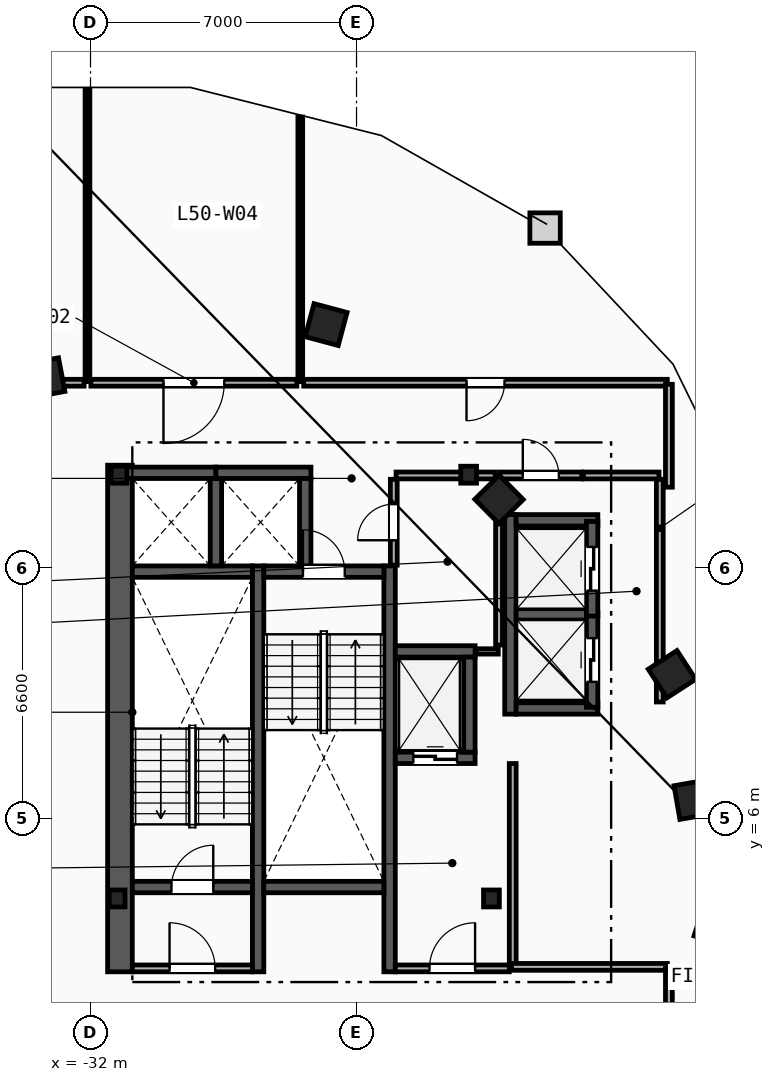
"""IFC4 building model, lengths in metres.
Left out: names, types, materials, properties, quantities, classifications, styles, units other than length and angle.
Written with IfcOpenShell. Run it as: python <this file> out.ifc"""

import sys

from ifc_helpers import new_model, si_unit, direction, frame, frame_2d, origin, origin_2d, place, context, subcontext, project, spatial, rectangle, i_section, extrude, element, fill, save


model = new_model("IFC4")
c1 = context("Model", 3, precision=1e-05, world=origin(), true_north=direction((0.0, 1.0)))
c2 = subcontext(c1, "Body", "Model", "MODEL_VIEW")
j1 = project(units=[si_unit("LENGTHUNIT", "METRE"), si_unit("PLANEANGLEUNIT", "RADIAN")], contexts=[c1])
p1 = place(None, origin())
s1 = spatial("IfcSite", under=j1, at=p1, CompositionType="ELEMENT")
p2 = place(p1, origin())
s2 = spatial("IfcBuilding", under=s1, at=p2, CompositionType="ELEMENT")
p3 = place(p2, frame((0.0, 0.0, 191.8)))
s3 = spatial("IfcBuildingStorey", under=s2, at=p3, CompositionType="ELEMENT", Elevation=191.8)
for number, where, z_axis, x_axis in (
    (1, (-31.3, 3.9, 0.0), (0.0, 0.0, 1.0), (1.0, 0.0, 0.0)),
    (2, (-21.45, 3.9, 0.0), (0.0, 0.0, 1.0), (1.0, 0.0, 0.0)),
    (3, (-22.05, 15.05, 0.0), (0.0, 0.0, 1.0), (1.0, 0.0, 0.0)),
    (4, (-31.25, 15.05, 0.0), (0.0, 0.0, 1.0), (1.0, 0.0, 0.0)),
):
    element("IfcColumn", number, at=place(p3, frame(where, z_axis=z_axis, x_axis=x_axis)), inside=s3, PredefinedType="COLUMN", context=c2, shape_type="SweptSolid", body=[
        extrude(i_section(OverallWidth=0.416, OverallDepth=0.446, WebThickness=0.039, FlangeThickness=0.063, FilletRadius=0.018, at=origin_2d()), origin(), (0.0, 0.0, 1.0), 3.6),
    ])
for number, where, z_axis, x_axis in (
    (5, (-15.55, 3.2, 0.0), (0.0, 0.0, 1.0), (0.315, 0.949, 0.0)),
    (6, (-16.125, 6.5, 0.0), (0.0, 0.0, 1.0), (-0.172, 0.985, 0.0)),
    (7, (-16.7, 9.8, 0.0), (0.0, 0.0, 1.0), (-0.544, 0.839, 0.0)),
    (8, (-21.25, 14.4, 0.0), (0.0, 0.0, 1.0), (-0.703, 0.711, 0.0)),
    (9, (-25.8, 19.0, 0.0), (0.0, 0.0, 1.0), (-0.966, 0.259, 0.0)),
    (10, (-33.2, 17.6, 0.0), (0.0, 0.0, 1.0), (-0.983, -0.186, 0.0)),
):
    element("IfcColumn", number, at=place(p3, frame(where, z_axis=z_axis, x_axis=x_axis)), inside=s3, PredefinedType="COLUMN", context=c2, shape_type="SweptSolid", body=[
        extrude(rectangle(XDim=0.9, YDim=0.9, at=origin_2d()), origin(), (0.0, 0.0, 1.0), 3.6),
    ])
p4 = place(p3, frame((-31.225, 1.97, 0.0), z_axis=(0.0, 0.0, 1.0), x_axis=(0.0, 1.0, 0.0)))
e11 = element("IfcWall", 11, at=p4, inside=s3, PredefinedType="SHEAR", context=c2, shape_type="SweptSolid", body=[
    extrude(rectangle(XDim=13.33, YDim=0.65, at=frame_2d((6.665, 0.0))), origin(), (0.0, 0.0, 1.0), 3.34),
])
for number, where, z_axis, x_axis in (
    (12, (-27.59, 1.97, 0.0), (0.0, 0.0, 1.0), (0.0, 1.0, 0.0)),
    (13, (-24.13, 1.97, 0.0), (0.0, 0.0, 1.0), (0.0, 1.0, 0.0)),
):
    element("IfcWall", number, at=place(p3, frame(where, z_axis=z_axis, x_axis=x_axis)), inside=s3, PredefinedType="SHEAR", context=c2, shape_type="SweptSolid", body=[
        extrude(rectangle(XDim=10.68, YDim=0.3, at=frame_2d((5.34, 0.0))), origin(), (0.0, 0.0, 1.0), 3.34),
    ])
p5 = place(p3, frame((-30.9, 4.2, 0.0), z_axis=(0.0, 0.0, 1.0), x_axis=(1.0, 0.0, 0.0)))
e14 = element("IfcWall", 14, at=p5, inside=s3, PredefinedType="SHEAR", context=c2, shape_type="SweptSolid", body=[
    extrude(rectangle(XDim=3.16, YDim=0.3, at=frame_2d((1.58, 0.0))), origin(), (0.0, 0.0, 1.0), 3.34),
])
p6 = place(p5, frame((1.03, 0.0, 0.0)))
e15 = element("IfcOpeningElement", 15, at=p6, cuts=e14, PredefinedType="OPENING", context=c2, shape_type="SweptSolid", body=[
    extrude(rectangle(XDim=1.1, YDim=2.15, at=frame_2d((0.55, 1.075))), frame((0.0, 0.16, 0.0), z_axis=(0.0, -1.0, 0.0), x_axis=(1.0, 0.0, 0.0)), (0.0, 0.0, 1.0), 0.32),
])
p7 = place(p3, frame((-30.9, 12.5, 0.0), z_axis=(0.0, 0.0, 1.0), x_axis=(1.0, 0.0, 0.0)))
e16 = element("IfcWall", 16, at=p7, inside=s3, PredefinedType="SHEAR", context=c2, shape_type="SweptSolid", body=[
    extrude(rectangle(XDim=3.16, YDim=0.3, at=frame_2d((1.58, 0.0))), origin(), (0.0, 0.0, 1.0), 3.34),
])
p8 = place(p3, frame((-27.44, 12.5, 0.0), z_axis=(0.0, 0.0, 1.0), x_axis=(1.0, 0.0, 0.0)))
e17 = element("IfcWall", 17, at=p8, inside=s3, PredefinedType="SHEAR", context=c2, shape_type="SweptSolid", body=[
    extrude(rectangle(XDim=3.16, YDim=0.3, at=frame_2d((1.58, 0.0))), origin(), (0.0, 0.0, 1.0), 3.34),
])
p9 = place(p8, frame((1.03, 0.0, 0.0)))
e18 = element("IfcOpeningElement", 18, at=p9, cuts=e17, PredefinedType="OPENING", context=c2, shape_type="SweptSolid", body=[
    extrude(rectangle(XDim=1.1, YDim=2.15, at=frame_2d((0.55, 1.075))), frame((0.0, 0.16, 0.0), z_axis=(0.0, -1.0, 0.0), x_axis=(1.0, 0.0, 0.0)), (0.0, 0.0, 1.0), 0.32),
])
p10 = place(p3, frame((-27.44, 4.2, 0.0), z_axis=(0.0, 0.0, 1.0), x_axis=(1.0, 0.0, 0.0)))
e19 = element("IfcWall", 19, at=p10, inside=s3, PredefinedType="SHEAR", context=c2, shape_type="SweptSolid", body=[
    extrude(rectangle(XDim=3.16, YDim=0.3, at=frame_2d((1.58, 0.0))), origin(), (0.0, 0.0, 1.0), 3.34),
])
p11 = place(p3, frame((-20.89, 2.15, 0.0), z_axis=(0.0, 0.0, 1.0), x_axis=(0.0, 1.0, 0.0)))
e20 = element("IfcWall", 20, at=p11, inside=s3, PredefinedType="PARTITIONING", context=c2, shape_type="SweptSolid", body=[
    extrude(rectangle(XDim=5.3, YDim=0.18, at=frame_2d((2.65, 0.0))), origin(), (0.0, 0.0, 1.0), 3.34),
])
p12 = place(p3, frame((-23.98, 2.06, 0.0), z_axis=(0.0, 0.0, 1.0), x_axis=(1.0, 0.0, 0.0)))
e21 = element("IfcWall", 21, at=p12, inside=s3, PredefinedType="PARTITIONING", context=c2, shape_type="SweptSolid", body=[
    extrude(rectangle(XDim=3.0, YDim=0.18, at=frame_2d((1.5, 0.0))), origin(), (0.0, 0.0, 1.0), 3.34),
])
p13 = place(p12, frame((0.9, 0.0, 0.0)))
e22 = element("IfcOpeningElement", 22, at=p13, cuts=e21, PredefinedType="OPENING", context=c2, shape_type="SweptSolid", body=[
    extrude(rectangle(XDim=1.2, YDim=2.15, at=frame_2d((0.6, 1.075))), frame((0.0, 0.1, 0.0), z_axis=(0.0, -1.0, 0.0), x_axis=(1.0, 0.0, 0.0)), (0.0, 0.0, 1.0), 0.2),
])
p14 = place(p3, frame((-30.9, 2.06, 0.0), z_axis=(0.0, 0.0, 1.0), x_axis=(1.0, 0.0, 0.0)))
e23 = element("IfcWall", 23, at=p14, inside=s3, PredefinedType="PARTITIONING", context=c2, shape_type="SweptSolid", body=[
    extrude(rectangle(XDim=3.16, YDim=0.18, at=frame_2d((1.58, 0.0))), origin(), (0.0, 0.0, 1.0), 3.34),
])
p15 = place(p14, frame((0.98, 0.0, 0.0)))
e24 = element("IfcOpeningElement", 24, at=p15, cuts=e23, PredefinedType="OPENING", context=c2, shape_type="SweptSolid", body=[
    extrude(rectangle(XDim=1.2, YDim=2.15, at=frame_2d((0.6, 1.075))), frame((0.0, 0.1, 0.0), z_axis=(0.0, -1.0, 0.0), x_axis=(1.0, 0.0, 0.0)), (0.0, 0.0, 1.0), 0.2),
])
p16 = place(p3, frame((-23.98, 7.6, 0.0), z_axis=(0.0, 0.0, 1.0), x_axis=(1.0, 0.0, 0.0)))
e25 = element("IfcWall", 25, at=p16, inside=s3, PredefinedType="SHEAR", context=c2, shape_type="SweptSolid", body=[
    extrude(rectangle(XDim=2.1, YDim=0.3, at=frame_2d((1.05, 0.0))), origin(), (0.0, 0.0, 1.0), 3.34),
])
p17 = place(p16, frame((0.475, 0.0, 0.0)))
e26 = element("IfcOpeningElement", 26, at=p17, cuts=e25, PredefinedType="OPENING", context=c2, shape_type="SweptSolid", body=[
    extrude(rectangle(XDim=1.15, YDim=2.2, at=frame_2d((0.575, 1.1))), frame((0.0, 0.16, 0.0), z_axis=(0.0, -1.0, 0.0), x_axis=(1.0, 0.0, 0.0)), (0.0, 0.0, 1.0), 0.32),
])
p18 = place(p3, frame((-23.98, 10.4, 0.0), z_axis=(0.0, 0.0, 1.0), x_axis=(1.0, 0.0, 0.0)))
e27 = element("IfcWall", 27, at=p18, inside=s3, PredefinedType="SHEAR", context=c2, shape_type="SweptSolid", body=[
    extrude(rectangle(XDim=2.1, YDim=0.3, at=frame_2d((1.05, 0.0))), origin(), (0.0, 0.0, 1.0), 3.34),
])
for number, where, z_axis, x_axis in (
    (28, (-22.03, 7.75, 0.0), (0.0, 0.0, 1.0), (0.0, 1.0, 0.0)),
    (29, (-31.2, 15.1, 0.0), (0.0, 0.0, 1.0), (1.0, 0.0, 0.0)),
):
    element("IfcWall", number, at=place(p3, frame(where, z_axis=z_axis, x_axis=x_axis)), inside=s3, PredefinedType="SHEAR", context=c2, shape_type="SweptSolid", body=[
        extrude(rectangle(XDim=2.5, YDim=0.3, at=frame_2d((1.25, 0.0))), origin(), (0.0, 0.0, 1.0), 3.34),
    ])
p19 = place(p3, frame((-28.7, 12.65, 0.0), z_axis=(0.0, 0.0, 1.0), x_axis=(0.0, 1.0, 0.0)))
e30 = element("IfcWall", 30, at=p19, inside=s3, PredefinedType="SHEAR", context=c2, shape_type="SweptSolid", body=[
    extrude(rectangle(XDim=2.3, YDim=0.3, at=frame_2d((1.15, 0.0))), origin(), (0.0, 0.0, 1.0), 3.34),
])
p20 = place(p3, frame((-28.7, 15.1, 0.0), z_axis=(0.0, 0.0, 1.0), x_axis=(1.0, 0.0, 0.0)))
e31 = element("IfcWall", 31, at=p20, inside=s3, PredefinedType="SHEAR", context=c2, shape_type="SweptSolid", body=[
    extrude(rectangle(XDim=2.5, YDim=0.3, at=frame_2d((1.25, 0.0))), origin(), (0.0, 0.0, 1.0), 3.34),
])
p21 = place(p3, frame((-26.35, 12.65, 0.0), z_axis=(0.0, 0.0, 1.0), x_axis=(0.0, 1.0, 0.0)))
e32 = element("IfcWall", 32, at=p21, inside=s3, PredefinedType="SHEAR", context=c2, shape_type="SweptSolid", body=[
    extrude(rectangle(XDim=2.3, YDim=0.3, at=frame_2d((1.15, 0.0))), origin(), (0.0, 0.0, 1.0), 3.34),
])
p22 = place(p3, frame((-20.95, 8.75, 0.0), z_axis=(0.0, 0.0, 1.0), x_axis=(0.0, 1.0, 0.0)))
e33 = element("IfcWall", 33, at=p22, inside=s3, PredefinedType="SHEAR", context=c2, shape_type="SweptSolid", body=[
    extrude(rectangle(XDim=5.25, YDim=0.3, at=frame_2d((2.625, 0.0))), origin(), (0.0, 0.0, 1.0), 3.34),
])
for number, where, z_axis, x_axis in (
    (34, (-20.8, 8.9, 0.0), (0.0, 0.0, 1.0), (1.0, 0.0, 0.0)),
    (35, (-20.8, 13.85, 0.0), (0.0, 0.0, 1.0), (1.0, 0.0, 0.0)),
):
    element("IfcWall", number, at=place(p3, frame(where, z_axis=z_axis, x_axis=x_axis)), inside=s3, PredefinedType="SHEAR", context=c2, shape_type="SweptSolid", body=[
        extrude(rectangle(XDim=2.15, YDim=0.3, at=frame_2d((1.075, 0.0))), origin(), (0.0, 0.0, 1.0), 3.34),
    ])
p23 = place(p3, frame((-20.8, 11.375, 0.0), z_axis=(0.0, 0.0, 1.0), x_axis=(1.0, 0.0, 0.0)))
e36 = element("IfcWall", 36, at=p23, inside=s3, PredefinedType="SHEAR", context=c2, shape_type="SweptSolid", body=[
    extrude(rectangle(XDim=1.85, YDim=0.3, at=frame_2d((0.925, 0.0))), origin(), (0.0, 0.0, 1.0), 3.34),
])
p24 = place(p3, frame((-18.8, 8.93, 0.0), z_axis=(0.0, 0.0, 1.0), x_axis=(0.0, 1.0, 0.0)))
e37 = element("IfcWall", 37, at=p24, inside=s3, PredefinedType="SHEAR", context=c2, shape_type="SweptSolid", body=[
    extrude(rectangle(XDim=2.49, YDim=0.3, at=frame_2d((1.245, 0.0))), origin(), (0.0, 0.0, 1.0), 3.34),
])
p25 = place(p24, frame((0.67, 0.0, 0.0)))
e38 = element("IfcOpeningElement", 38, at=p25, cuts=e37, PredefinedType="OPENING", context=c2, shape_type="SweptSolid", body=[
    extrude(rectangle(XDim=1.15, YDim=2.2, at=frame_2d((0.575, 1.1))), frame((0.0, 0.16, 0.0), z_axis=(0.0, -1.0, 0.0), x_axis=(1.0, 0.0, 0.0)), (0.0, 0.0, 1.0), 0.32),
])
p26 = place(p3, frame((-18.8, 11.33, 0.0), z_axis=(0.0, 0.0, 1.0), x_axis=(0.0, 1.0, 0.0)))
e39 = element("IfcWall", 39, at=p26, inside=s3, PredefinedType="SHEAR", context=c2, shape_type="SweptSolid", body=[
    extrude(rectangle(XDim=2.49, YDim=0.3, at=frame_2d((1.245, 0.0))), origin(), (0.0, 0.0, 1.0), 3.34),
])
p27 = place(p26, frame((0.67, 0.0, 0.0)))
e40 = element("IfcOpeningElement", 40, at=p27, cuts=e39, PredefinedType="OPENING", context=c2, shape_type="SweptSolid", body=[
    extrude(rectangle(XDim=1.15, YDim=2.2, at=frame_2d((0.575, 1.1))), frame((0.0, 0.16, 0.0), z_axis=(0.0, -1.0, 0.0), x_axis=(1.0, 0.0, 0.0)), (0.0, 0.0, 1.0), 0.32),
])
p28 = place(p3, frame((-17.02, 9.07, 0.0), z_axis=(0.0, 0.0, 1.0), x_axis=(0.0, 1.0, 0.0)))
e41 = element("IfcWall", 41, at=p28, inside=s3, PredefinedType="PARTITIONING", context=c2, shape_type="SweptSolid", body=[
    extrude(rectangle(XDim=5.86, YDim=0.18, at=frame_2d((2.93, 0.0))), origin(), (0.0, 0.0, 1.0), 3.34),
])
p29 = place(p3, frame((-21.23, 15.03, 0.0), z_axis=(0.0, 0.0, 1.0), x_axis=(1.0, 0.0, 0.0)))
e42 = element("IfcWall", 42, at=p29, inside=s3, PredefinedType="PARTITIONING", context=c2, shape_type="SweptSolid", body=[
    extrude(rectangle(XDim=2.16, YDim=0.18, at=frame_2d((1.08, 0.0))), origin(), (0.0, 0.0, 1.0), 3.34),
])
p30 = place(p29, frame((0.605, 0.0, 0.0)))
e43 = element("IfcOpeningElement", 43, at=p30, cuts=e42, PredefinedType="OPENING", context=c2, shape_type="SweptSolid", body=[
    extrude(rectangle(XDim=0.95, YDim=2.1, at=frame_2d((0.475, 1.05))), frame((0.0, 0.1, 0.0), z_axis=(0.0, -1.0, 0.0), x_axis=(1.0, 0.0, 0.0)), (0.0, 0.0, 1.0), 0.2),
])
p31 = place(p3, frame((-19.03, 15.03, 0.0), z_axis=(0.0, 0.0, 1.0), x_axis=(1.0, 0.0, 0.0)))
e44 = element("IfcWall", 44, at=p31, inside=s3, PredefinedType="PARTITIONING", context=c2, shape_type="SweptSolid", body=[
    extrude(rectangle(XDim=1.99, YDim=0.18, at=frame_2d((0.995, 0.0))), origin(), (0.0, 0.0, 1.0), 3.34),
])
p32 = place(p3, frame((-21.86, 10.4, 0.0), z_axis=(0.0, 0.0, 1.0), x_axis=(1.0, 0.0, 0.0)))
e45 = element("IfcWall", 45, at=p32, inside=s3, PredefinedType="PARTITIONING", context=c2, shape_type="SweptSolid", body=[
    extrude(rectangle(XDim=0.59, YDim=0.14, at=frame_2d((0.295, 0.0))), origin(), (0.0, 0.0, 1.0), 3.34),
])
p33 = place(p3, frame((-21.25, 10.57, 0.0), z_axis=(0.0, 0.0, 1.0), x_axis=(0.0, 1.0, 0.0)))
e46 = element("IfcWall", 46, at=p33, inside=s3, PredefinedType="PARTITIONING", context=c2, shape_type="SweptSolid", body=[
    extrude(rectangle(XDim=4.36, YDim=0.18, at=frame_2d((2.18, 0.0))), origin(), (0.0, 0.0, 1.0), 3.34),
])
p34 = place(p3, frame((-23.96, 15.03, 0.0), z_axis=(0.0, 0.0, 1.0), x_axis=(1.0, 0.0, 0.0)))
e47 = element("IfcWall", 47, at=p34, inside=s3, PredefinedType="PARTITIONING", context=c2, shape_type="SweptSolid", body=[
    extrude(rectangle(XDim=2.61, YDim=0.18, at=frame_2d((1.305, 0.0))), origin(), (0.0, 0.0, 1.0), 2.413),
])
p35 = place(p3, frame((-24.02, 12.67, 0.0), z_axis=(0.0, 0.0, 1.0), x_axis=(0.0, 1.0, 0.0)))
e48 = element("IfcWall", 48, at=p35, inside=s3, PredefinedType="PARTITIONING", context=c2, shape_type="SweptSolid", body=[
    extrude(rectangle(XDim=2.26, YDim=0.18, at=frame_2d((1.13, 0.0))), origin(), (0.0, 0.0, 1.0), 3.34),
])
p36 = place(p35, frame((0.655, 0.0, 0.0)))
e49 = element("IfcOpeningElement", 49, at=p36, cuts=e48, PredefinedType="OPENING", context=c2, shape_type="SweptSolid", body=[
    extrude(rectangle(XDim=0.95, YDim=2.1, at=frame_2d((0.475, 1.05))), frame((0.0, 0.1, 0.0), z_axis=(0.0, -1.0, 0.0), x_axis=(1.0, 0.0, 0.0)), (0.0, 0.0, 1.0), 0.2),
])
p37 = place(p3, frame((-32.08, 17.5, 0.0), z_axis=(0.0, 0.0, 1.0), x_axis=(0.0, 1.0, 0.0)))
e50 = element("IfcWall", 50, at=p37, inside=s3, PredefinedType="PARTITIONING", context=c2, shape_type="SweptSolid", body=[
    extrude(rectangle(XDim=7.69, YDim=0.125, at=frame_2d((3.845, 0.0))), origin(), (0.0, 0.0, 1.0), 3.34),
])
p38 = place(p3, frame((-26.48, 17.5, 0.0), z_axis=(0.0, 0.0, 1.0), x_axis=(0.0, 1.0, 0.0)))
e51 = element("IfcWall", 51, at=p38, inside=s3, PredefinedType="PARTITIONING", context=c2, shape_type="SweptSolid", body=[
    extrude(rectangle(XDim=6.961, YDim=0.125, at=frame_2d((3.48, 0.0))), origin(), (0.0, 0.0, 1.0), 3.34),
])
p39 = place(p3, frame((-16.822, 17.47, 0.0), z_axis=(0.0, 0.0, 1.0), x_axis=(-1.0, 0.0, 0.0)))
e52 = element("IfcWall", 52, at=p39, inside=s3, PredefinedType="PARTITIONING", context=c2, shape_type="SweptSolid", body=[
    extrude(rectangle(XDim=9.568, YDim=0.18, at=frame_2d((4.784, 0.0))), origin(), (0.0, 0.0, 1.0), 3.34),
])
p40 = place(p39, frame((4.284, 0.0, 0.0)))
e53 = element("IfcOpeningElement", 53, at=p40, cuts=e52, PredefinedType="OPENING", context=c2, shape_type="SweptSolid", body=[
    extrude(rectangle(XDim=1.0, YDim=2.15, at=frame_2d((0.5, 1.075))), frame((0.0, 0.1, 0.0), z_axis=(0.0, -1.0, 0.0), x_axis=(1.0, 0.0, 0.0)), (0.0, 0.0, 1.0), 0.2),
])
p41 = place(p3, frame((-16.822, 2.1, 0.0), z_axis=(0.0, 0.0, 1.0), x_axis=(-1.0, 0.0, 0.0)))
e54 = element("IfcWall", 54, at=p41, inside=s3, PredefinedType="PARTITIONING", context=c2, shape_type="SweptSolid", body=[
    extrude(rectangle(XDim=4.098, YDim=0.18, at=frame_2d((2.049, 0.0))), origin(), (0.0, 0.0, 1.0), 3.34),
])
p42 = place(p3, frame((-16.78, 14.721, 0.0), z_axis=(0.0, 0.0, 1.0), x_axis=(0.0, 1.0, 0.0)))
e55 = element("IfcWall", 55, at=p42, inside=s3, PredefinedType="PARTITIONING", context=c2, shape_type="SweptSolid", body=[
    extrude(rectangle(XDim=2.707, YDim=0.18, at=frame_2d((1.354, 0.0))), origin(), (0.0, 0.0, 1.0), 3.34),
])
p43 = place(p3, frame((-16.78, -0.329, 0.0), z_axis=(0.0, 0.0, 1.0), x_axis=(0.0, 1.0, 0.0)))
e56 = element("IfcWall", 56, at=p43, inside=s3, PredefinedType="PARTITIONING", context=c2, shape_type="SweptSolid", body=[
    extrude(rectangle(XDim=2.387, YDim=0.18, at=frame_2d((1.194, 0.0))), origin(), (0.0, 0.0, 1.0), 3.34),
])
p44 = place(p3, frame((-32.17, 17.47, 0.0), z_axis=(0.0, 0.0, 1.0), x_axis=(-1.0, 0.0, 0.0)))
e57 = element("IfcWall", 57, at=p44, inside=s3, PredefinedType="PARTITIONING", context=c2, shape_type="SweptSolid", body=[
    extrude(rectangle(XDim=1.458, YDim=0.18, at=frame_2d((0.729, 0.0))), origin(), (0.0, 0.0, 1.0), 3.34),
])
p45 = place(p3, frame((-26.57, 17.47, 0.0), z_axis=(0.0, 0.0, 1.0), x_axis=(-1.0, 0.0, 0.0)))
e58 = element("IfcWall", 58, at=p45, inside=s3, PredefinedType="PARTITIONING", context=c2, shape_type="SweptSolid", body=[
    extrude(rectangle(XDim=5.42, YDim=0.18, at=frame_2d((2.71, 0.0))), origin(), (0.0, 0.0, 1.0), 3.34),
])
p46 = place(p45, frame((1.91, 0.0, 0.0)))
e59 = element("IfcOpeningElement", 59, at=p46, cuts=e58, PredefinedType="OPENING", context=c2, shape_type="SweptSolid", body=[
    extrude(rectangle(XDim=1.6, YDim=2.2, at=frame_2d((0.8, 1.1))), frame((0.0, 0.1, 0.0), z_axis=(0.0, -1.0, 0.0), x_axis=(1.0, 0.0, 0.0)), (0.0, 0.0, 1.0), 0.2),
])
p47 = place(p6, origin())
e60 = element("IfcDoor", 60, at=p47, inside=s3, OperationType="SINGLE_SWING_RIGHT", PredefinedType="DOOR", context=c2, shape_type="SweptSolid", body=[
    extrude(rectangle(XDim=1.1, YDim=2.15, at=frame_2d((0.55, 1.075))), frame((0.0, 0.025, 0.0), z_axis=(0.0, -1.0, 0.0), x_axis=(1.0, 0.0, 0.0)), (0.0, 0.0, 1.0), 0.05),
])
fill(e15, e60)
p48 = place(p9, origin())
e61 = element("IfcDoor", 61, at=p48, inside=s3, OperationType="SINGLE_SWING_LEFT", PredefinedType="DOOR", context=c2, shape_type="SweptSolid", body=[
    extrude(rectangle(XDim=1.1, YDim=2.15, at=frame_2d((0.55, 1.075))), frame((0.0, 0.025, 0.0), z_axis=(0.0, -1.0, 0.0), x_axis=(1.0, 0.0, 0.0)), (0.0, 0.0, 1.0), 0.05),
])
fill(e18, e61)
p49 = place(p13, origin())
e62 = element("IfcDoor", 62, at=p49, inside=s3, OperationType="SINGLE_SWING_RIGHT", PredefinedType="DOOR", context=c2, shape_type="SweptSolid", body=[
    extrude(rectangle(XDim=1.2, YDim=2.15, at=frame_2d((0.6, 1.075))), frame((0.0, 0.025, 0.0), z_axis=(0.0, -1.0, 0.0), x_axis=(1.0, 0.0, 0.0)), (0.0, 0.0, 1.0), 0.05),
])
fill(e22, e62)
p50 = place(p15, origin())
e63 = element("IfcDoor", 63, at=p50, inside=s3, OperationType="SINGLE_SWING_LEFT", PredefinedType="DOOR", context=c2, shape_type="SweptSolid", body=[
    extrude(rectangle(XDim=1.2, YDim=2.15, at=frame_2d((0.6, 1.075))), frame((0.0, 0.025, 0.0), z_axis=(0.0, -1.0, 0.0), x_axis=(1.0, 0.0, 0.0)), (0.0, 0.0, 1.0), 0.05),
])
fill(e24, e63)
p51 = place(p17, origin())
e64 = element("IfcDoor", 64, at=p51, inside=s3, OperationType="SLIDING_TO_LEFT", PredefinedType="TRAPDOOR", context=c2, shape_type="SweptSolid", body=[
    extrude(rectangle(XDim=1.15, YDim=2.2, at=frame_2d((0.575, 1.1))), frame((0.0, 0.025, 0.0), z_axis=(0.0, -1.0, 0.0), x_axis=(1.0, 0.0, 0.0)), (0.0, 0.0, 1.0), 0.05),
])
fill(e26, e64)
p52 = place(p25, origin())
e65 = element("IfcDoor", 65, at=p52, inside=s3, OperationType="SLIDING_TO_LEFT", PredefinedType="TRAPDOOR", context=c2, shape_type="SweptSolid", body=[
    extrude(rectangle(XDim=1.15, YDim=2.2, at=frame_2d((0.575, 1.1))), frame((0.0, 0.025, 0.0), z_axis=(0.0, -1.0, 0.0), x_axis=(1.0, 0.0, 0.0)), (0.0, 0.0, 1.0), 0.05),
])
fill(e38, e65)
p53 = place(p27, origin())
e66 = element("IfcDoor", 66, at=p53, inside=s3, OperationType="SLIDING_TO_LEFT", PredefinedType="TRAPDOOR", context=c2, shape_type="SweptSolid", body=[
    extrude(rectangle(XDim=1.15, YDim=2.2, at=frame_2d((0.575, 1.1))), frame((0.0, 0.025, 0.0), z_axis=(0.0, -1.0, 0.0), x_axis=(1.0, 0.0, 0.0)), (0.0, 0.0, 1.0), 0.05),
])
fill(e40, e66)
p54 = place(p40, origin())
e67 = element("IfcDoor", 67, at=p54, inside=s3, OperationType="SINGLE_SWING_RIGHT", PredefinedType="DOOR", context=c2, shape_type="SweptSolid", body=[
    extrude(rectangle(XDim=1.0, YDim=2.15, at=frame_2d((0.5, 1.075))), frame((0.0, 0.025, 0.0), z_axis=(0.0, -1.0, 0.0), x_axis=(1.0, 0.0, 0.0)), (0.0, 0.0, 1.0), 0.05),
])
fill(e53, e67)
p55 = place(p46, origin())
e68 = element("IfcDoor", 68, at=p55, inside=s3, OperationType="SINGLE_SWING_RIGHT", PredefinedType="DOOR", context=c2, shape_type="SweptSolid", body=[
    extrude(rectangle(XDim=1.6, YDim=2.2, at=frame_2d((0.8, 1.1))), frame((0.0, 0.025, 0.0), z_axis=(0.0, -1.0, 0.0), x_axis=(1.0, 0.0, 0.0)), (0.0, 0.0, 1.0), 0.05),
])
fill(e59, e68)
p56 = place(p36, origin())
e69 = element("IfcDoor", 69, at=p56, inside=s3, OperationType="SINGLE_SWING_LEFT", PredefinedType="DOOR", context=c2, shape_type="SweptSolid", body=[
    extrude(rectangle(XDim=0.95, YDim=2.1, at=frame_2d((0.475, 1.05))), frame((0.0, 0.025, 0.0), z_axis=(0.0, -1.0, 0.0), x_axis=(1.0, 0.0, 0.0)), (0.0, 0.0, 1.0), 0.05),
])
fill(e49, e69)
p57 = place(p30, origin())
e70 = element("IfcDoor", 70, at=p57, inside=s3, OperationType="SINGLE_SWING_LEFT", PredefinedType="DOOR", context=c2, shape_type="SweptSolid", body=[
    extrude(rectangle(XDim=0.95, YDim=2.1, at=frame_2d((0.475, 1.05))), frame((0.0, 0.025, 0.0), z_axis=(0.0, -1.0, 0.0), x_axis=(1.0, 0.0, 0.0)), (0.0, 0.0, 1.0), 0.05),
])
fill(e43, e70)
save(model, sys.argv[1])
